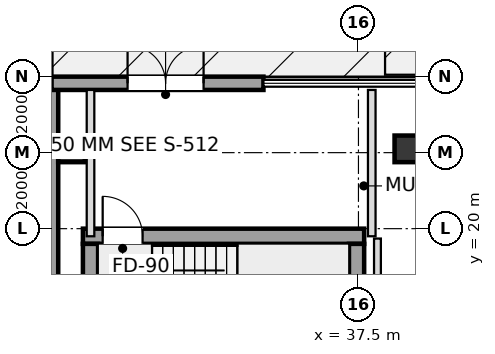
"""IFC4 building model, lengths in metres.
Left out: names, types, materials, properties, quantities, classifications, styles, units other than length and angle.
Written with IfcOpenShell. Run it as: python <this file> out.ifc"""

import sys

from ifc_helpers import new_model, si_unit, direction, frame, frame_2d, origin, origin_2d, place, context, subcontext, project, spatial, rectangle, extrude, element, fill, save


model = new_model("IFC4")
c1 = context("Model", 3, precision=1e-05, world=origin(), true_north=direction((0.0, 1.0)))
c2 = subcontext(c1, "Body", "Model", "MODEL_VIEW")
j1 = project(units=[si_unit("LENGTHUNIT", "METRE"), si_unit("PLANEANGLEUNIT", "RADIAN")], contexts=[c1])
p1 = place(None, origin())
s1 = spatial("IfcSite", under=j1, at=p1, CompositionType="ELEMENT")
p2 = place(p1, origin())
s2 = spatial("IfcBuilding", under=s1, at=p2, CompositionType="ELEMENT")
p3 = place(p2, origin())
s3 = spatial("IfcBuildingStorey", under=s2, at=p3, CompositionType="ELEMENT", Elevation=0.0)
for number, where, z_axis, x_axis in (
    (1, (29.95, 22.1, 0.0), (0.0, 0.0, 1.0), (1.0, 0.0, 0.0)),
    (2, (38.8, 22.1, 0.0), (0.0, 0.0, 1.0), (1.0, 0.0, 0.0)),
):
    element("IfcColumn", number, at=place(p3, frame(where, z_axis=z_axis, x_axis=x_axis)), inside=s3, PredefinedType="COLUMN", context=c2, shape_type="SweptSolid", body=[
        extrude(rectangle(XDim=0.7, YDim=0.7, at=origin_2d()), origin(), (0.0, 0.0, 1.0), 6.0),
    ])
p4 = place(p3, frame((29.425, 23.825, 0.0), z_axis=(0.0, 0.0, 1.0), x_axis=(0.0, -1.0, 0.0)))
e3 = element("IfcWall", 3, at=p4, inside=s3, PredefinedType="SOLIDWALL", context=c2, shape_type="SweptSolid", body=[
    extrude(rectangle(XDim=47.65, YDim=0.35, at=frame_2d((23.825, 0.0))), origin(), (0.0, 0.0, 1.0), 5.68),
])
p5 = place(p4, frame((22.8, 0.0, 0.0)))
e4 = element("IfcOpeningElement", 4, at=p5, cuts=e3, PredefinedType="OPENING", context=c2, shape_type="SweptSolid", body=[
    extrude(rectangle(XDim=2.2, YDim=2.5, at=frame_2d((1.1, 1.25))), frame((0.0, 0.185, 0.0), z_axis=(0.0, -1.0, 0.0), x_axis=(1.0, 0.0, 0.0)), (0.0, 0.0, 1.0), 0.37),
])
p6 = place(p3, frame((29.425, 23.825, 0.0), z_axis=(0.0, 0.0, 1.0), x_axis=(1.0, 0.0, 0.0)))
e5 = element("IfcWall", 5, at=p6, inside=s3, PredefinedType="SOLIDWALL", context=c2, shape_type="SweptSolid", body=[
    extrude(rectangle(XDim=5.575, YDim=0.35, at=frame_2d((2.788, 0.0))), origin(), (0.0, 0.0, 1.0), 5.68),
])
p7 = place(p6, frame((2.0, 0.0, 0.0)))
e6 = element("IfcOpeningElement", 6, at=p7, cuts=e5, PredefinedType="OPENING", context=c2, shape_type="SweptSolid", body=[
    extrude(rectangle(XDim=2.0, YDim=2.2, at=frame_2d((1.0, 1.1))), frame((0.0, 0.185, 0.0), z_axis=(0.0, -1.0, 0.0), x_axis=(1.0, 0.0, 0.0)), (0.0, 0.0, 1.0), 0.37),
])
p8 = place(p3, frame((30.25, 19.8, 0.0), z_axis=(0.0, 0.0, 1.0), x_axis=(1.0, 0.0, 0.0)))
e7 = element("IfcWall", 7, at=p8, inside=s3, PredefinedType="SHEAR", context=c2, shape_type="SweptSolid", body=[
    extrude(rectangle(XDim=7.4, YDim=0.4, at=frame_2d((3.7, 0.0))), origin(), (0.0, 0.0, 1.0), 5.68),
])
p9 = place(p8, frame((0.52, 0.0, 0.0)))
e8 = element("IfcOpeningElement", 8, at=p9, cuts=e7, PredefinedType="OPENING", context=c2, shape_type="SweptSolid", body=[
    extrude(rectangle(XDim=1.05, YDim=2.15, at=frame_2d((0.525, 1.075))), frame((0.0, 0.21, 0.0), z_axis=(0.0, -1.0, 0.0), x_axis=(1.0, 0.0, 0.0)), (0.0, 0.0, 1.0), 0.42),
])
for number, where, z_axis, x_axis in (
    (9, (37.45, 16.6, 0.0), (0.0, 0.0, 1.0), (0.0, 1.0, 0.0)),
    (10, (30.45, 16.6, 0.0), (0.0, 0.0, 1.0), (0.0, 1.0, 0.0)),
):
    element("IfcWall", number, at=place(p3, frame(where, z_axis=z_axis, x_axis=x_axis)), inside=s3, PredefinedType="SHEAR", context=c2, shape_type="SweptSolid", body=[
        extrude(rectangle(XDim=3.0, YDim=0.4, at=frame_2d((1.5, 0.0))), origin(), (0.0, 0.0, 1.0), 5.68),
    ])
for number, where, z_axis, x_axis in (
    (11, (30.45, 19.8, 0.0), (0.0, 0.0, 1.0), (0.0, 1.0, 0.0)),
    (12, (37.85, 19.8, 0.0), (0.0, 0.0, 1.0), (0.0, 1.0, 0.0)),
):
    element("IfcWall", number, at=place(p3, frame(where, z_axis=z_axis, x_axis=x_axis)), inside=s3, PredefinedType="SOLIDWALL", context=c2, shape_type="SweptSolid", body=[
        extrude(rectangle(XDim=3.85, YDim=0.2, at=frame_2d((1.925, 0.0))), origin(), (0.0, 0.0, 1.0), 4.897),
    ])
p10 = place(p3, frame((38.0, 15.2, 0.0), z_axis=(0.0, 0.0, 1.0), x_axis=(0.0, 1.0, 0.0)))
e13 = element("IfcWall", 13, at=p10, inside=s3, PredefinedType="PARTITIONING", context=c2, shape_type="SweptSolid", body=[
    extrude(rectangle(XDim=4.54, YDim=0.18, at=frame_2d((2.27, 0.0))), origin(), (0.0, 0.0, 1.0), 5.68),
])
p11 = place(p7, origin())
e14 = element("IfcDoor", 14, at=p11, inside=s3, OperationType="DOUBLE_DOOR_SINGLE_SWING", PredefinedType="DOOR", context=c2, shape_type="SweptSolid", body=[
    extrude(rectangle(XDim=2.0, YDim=2.2, at=frame_2d((1.0, 1.1))), frame((0.0, 0.025, 0.0), z_axis=(0.0, -1.0, 0.0), x_axis=(1.0, 0.0, 0.0)), (0.0, 0.0, 1.0), 0.05),
])
fill(e6, e14)
p12 = place(p9, origin())
e15 = element("IfcDoor", 15, at=p12, inside=s3, OperationType="SINGLE_SWING_LEFT", PredefinedType="DOOR", context=c2, shape_type="SweptSolid", body=[
    extrude(rectangle(XDim=1.05, YDim=2.15, at=frame_2d((0.525, 1.075))), frame((0.0, 0.025, 0.0), z_axis=(0.0, -1.0, 0.0), x_axis=(1.0, 0.0, 0.0)), (0.0, 0.0, 1.0), 0.05),
])
fill(e8, e15)
save(model, sys.argv[1])
